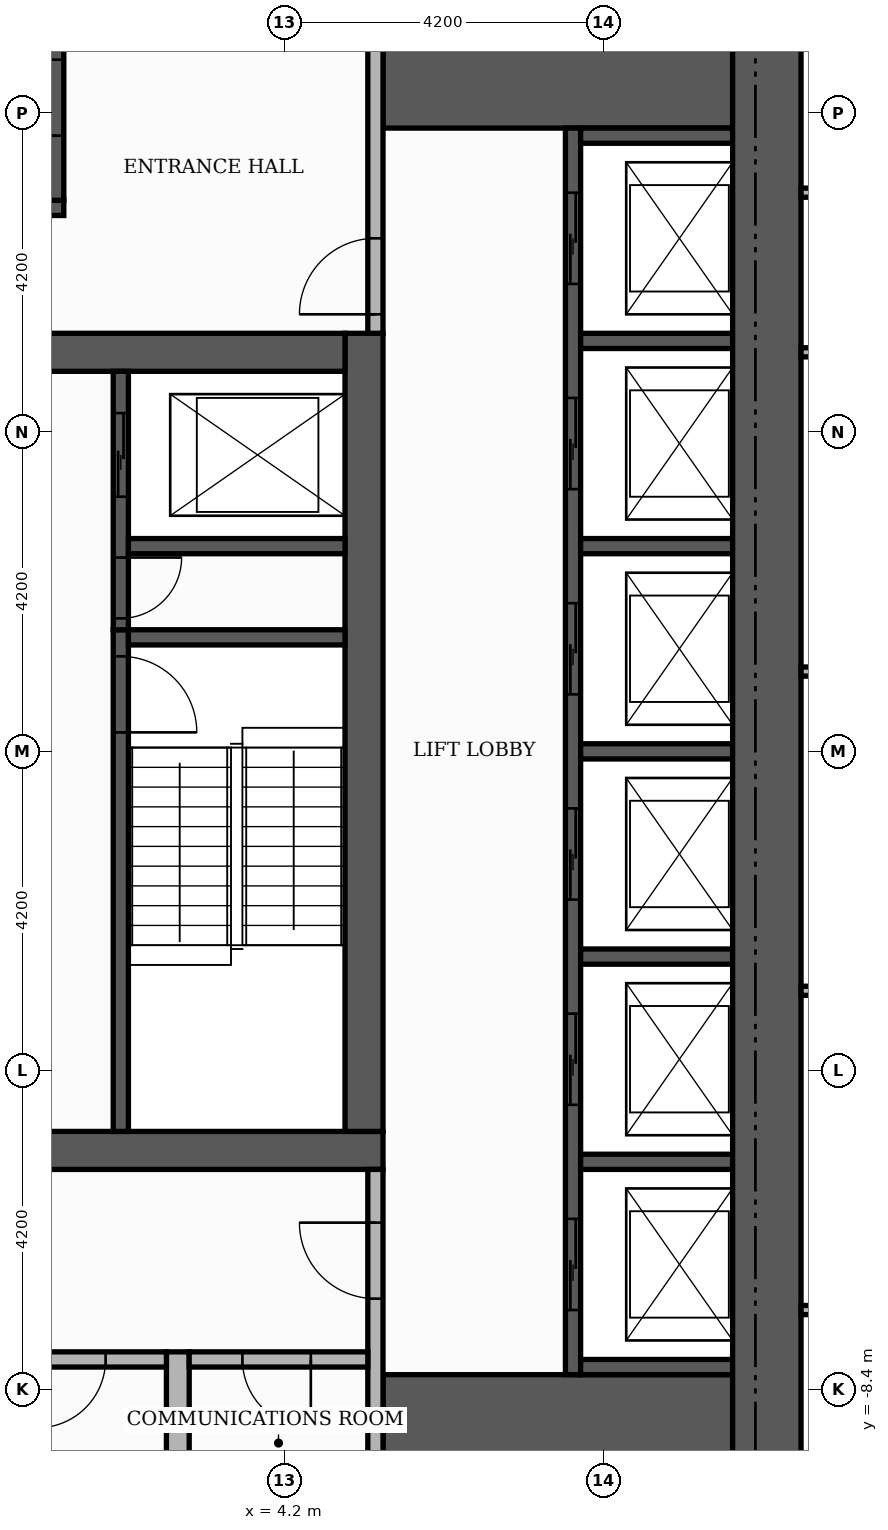
"""IFC4 building model, lengths in metres.
Left out: names, types, materials, properties, quantities, classifications, styles, units other than length and angle.
Written with IfcOpenShell. Run it as: python <this file> out.ifc"""

import sys

from ifc_helpers import new_model, si_unit, direction, frame, frame_2d, origin, place, context, subcontext, project, spatial, rectangle, extrude, element, fill, save


model = new_model("IFC4")
c1 = context("Model", 3, precision=1e-05, world=origin(), true_north=direction((0.0, 1.0)))
c2 = subcontext(c1, "Body", "Model", "MODEL_VIEW")
j1 = project(units=[si_unit("LENGTHUNIT", "METRE"), si_unit("PLANEANGLEUNIT", "RADIAN")], contexts=[c1])
p1 = place(None, origin())
s1 = spatial("IfcSite", under=j1, at=p1, CompositionType="ELEMENT")
p2 = place(p1, origin())
s2 = spatial("IfcBuilding", under=s1, at=p2, CompositionType="ELEMENT")
p3 = place(p2, frame((0.0, 0.0, 231.3)))
s3 = spatial("IfcBuildingStorey", under=s2, at=p3, CompositionType="ELEMENT", Elevation=231.3)
p4 = place(p3, frame((-5.5, -5.25, 0.0), z_axis=(0.0, 0.0, 1.0), x_axis=(1.0, 0.0, 0.0)))
e1 = element("IfcWall", 1, at=p4, inside=s3, PredefinedType="SHEAR", context=c2, shape_type="SweptSolid", body=[
    extrude(rectangle(XDim=11.0, YDim=0.5, at=frame_2d((5.5, 0.0))), origin(), (0.0, 0.0, 1.0), 3.4),
])
p5 = place(p4, frame((4.9, 0.0, 0.0)))
e2 = element("IfcOpeningElement", 2, at=p5, cuts=e1, PredefinedType="OPENING", context=c2, shape_type="SweptSolid", body=[
    extrude(rectangle(XDim=1.2, YDim=2.1, at=frame_2d((0.6, 1.05))), frame((0.0, 0.26, 0.0), z_axis=(0.0, -1.0, 0.0), x_axis=(1.0, 0.0, 0.0)), (0.0, 0.0, 1.0), 0.52),
])
p6 = place(p3, frame((5.25, -5.0, 0.0), z_axis=(0.0, 0.0, 1.0), x_axis=(0.0, 1.0, 0.0)))
e3 = element("IfcWall", 3, at=p6, inside=s3, PredefinedType="SHEAR", context=c2, shape_type="SweptSolid", body=[
    extrude(rectangle(XDim=10.5, YDim=0.5, at=frame_2d((5.25, 0.0))), origin(), (0.0, 0.0, 1.0), 3.4),
])
p7 = place(p3, frame((-5.0, 5.25, 0.0), z_axis=(0.0, 0.0, 1.0), x_axis=(1.0, 0.0, 0.0)))
e4 = element("IfcWall", 4, at=p7, inside=s3, PredefinedType="SHEAR", context=c2, shape_type="SweptSolid", body=[
    extrude(rectangle(XDim=10.0, YDim=0.5, at=frame_2d((5.0, 0.0))), origin(), (0.0, 0.0, 1.0), 3.4),
])
p8 = place(p7, frame((4.4, 0.0, 0.0)))
e5 = element("IfcOpeningElement", 5, at=p8, cuts=e4, PredefinedType="OPENING", context=c2, shape_type="SweptSolid", body=[
    extrude(rectangle(XDim=1.2, YDim=2.1, at=frame_2d((0.6, 1.05))), frame((0.0, 0.26, 0.0), z_axis=(0.0, -1.0, 0.0), x_axis=(1.0, 0.0, 0.0)), (0.0, 0.0, 1.0), 0.52),
])
for number, where, z_axis, x_axis in (
    (6, (5.5, -9.15, 0.0), (0.0, 0.0, 1.0), (1.0, 0.0, 0.0)),
    (7, (5.5, 9.15, 0.0), (0.0, 0.0, 1.0), (1.0, 0.0, 0.0)),
):
    element("IfcWall", number, at=place(p3, frame(where, z_axis=z_axis, x_axis=x_axis)), inside=s3, PredefinedType="SHEAR", context=c2, shape_type="SweptSolid", body=[
        extrude(rectangle(XDim=4.6, YDim=1.9, at=frame_2d((2.3, 0.0))), origin(), (0.0, 0.0, 1.0), 3.4),
    ])
p9 = place(p3, frame((2.05, -5.0, 0.0), z_axis=(0.0, 0.0, 1.0), x_axis=(0.0, 1.0, 0.0)))
e8 = element("IfcWall", 8, at=p9, inside=s3, PredefinedType="SHEAR", context=c2, shape_type="SweptSolid", body=[
    extrude(rectangle(XDim=6.6, YDim=0.2, at=frame_2d((3.3, 0.0))), origin(), (0.0, 0.0, 1.0), 3.4),
])
p10 = place(p9, frame((5.25, 0.0, 0.0)))
e9 = element("IfcOpeningElement", 9, at=p10, cuts=e8, PredefinedType="OPENING", context=c2, shape_type="SweptSolid", body=[
    extrude(rectangle(XDim=1.0, YDim=2.1, at=frame_2d((0.5, 1.05))), frame((0.0, 0.11, 0.0), z_axis=(0.0, -1.0, 0.0), x_axis=(1.0, 0.0, 0.0)), (0.0, 0.0, 1.0), 0.22),
])
p11 = place(p3, frame((2.15, 1.5, 0.0), z_axis=(0.0, 0.0, 1.0), x_axis=(1.0, 0.0, 0.0)))
e10 = element("IfcWall", 10, at=p11, inside=s3, PredefinedType="SHEAR", context=c2, shape_type="SweptSolid", body=[
    extrude(rectangle(XDim=2.85, YDim=0.2, at=frame_2d((1.425, 0.0))), origin(), (0.0, 0.0, 1.0), 3.4),
])
p12 = place(p3, frame((-5.5, 7.15, 0.0), z_axis=(0.0, 0.0, 1.0), x_axis=(1.0, 0.0, 0.0)))
e11 = element("IfcWall", 11, at=p12, inside=s3, PredefinedType="SHEAR", context=c2, shape_type="SweptSolid", body=[
    extrude(rectangle(XDim=6.8, YDim=0.2, at=frame_2d((3.4, 0.0))), origin(), (0.0, 0.0, 1.0), 3.4),
])
p13 = place(p3, frame((1.2, 7.25, 0.0), z_axis=(0.0, 0.0, 1.0), x_axis=(0.0, 1.0, 0.0)))
e12 = element("IfcWall", 12, at=p13, inside=s3, PredefinedType="SHEAR", context=c2, shape_type="SweptSolid", body=[
    extrude(rectangle(XDim=2.85, YDim=0.2, at=frame_2d((1.425, 0.0))), origin(), (0.0, 0.0, 1.0), 3.4),
])
p14 = place(p13, frame((0.85, 0.0, 0.0)))
e13 = element("IfcOpeningElement", 13, at=p14, cuts=e12, PredefinedType="OPENING", context=c2, shape_type="SweptSolid", body=[
    extrude(rectangle(XDim=1.0, YDim=2.1, at=frame_2d((0.5, 1.05))), frame((0.0, 0.11, 0.0), z_axis=(0.0, -1.0, 0.0), x_axis=(1.0, 0.0, 0.0)), (0.0, 0.0, 1.0), 0.22),
])
p15 = place(p3, frame((8.0, -8.2, 0.0), z_axis=(0.0, 0.0, 1.0), x_axis=(0.0, 1.0, 0.0)))
e14 = element("IfcWall", 14, at=p15, inside=s3, PredefinedType="SHEAR", context=c2, shape_type="SweptSolid", body=[
    extrude(rectangle(XDim=16.4, YDim=0.2, at=frame_2d((8.2, 0.0))), origin(), (0.0, 0.0, 1.0), 3.4),
])
p16 = place(p15, frame((0.85, 0.0, 0.0)))
e15 = element("IfcOpeningElement", 15, at=p16, cuts=e14, PredefinedType="OPENING", context=c2, shape_type="SweptSolid", body=[
    extrude(rectangle(XDim=1.2, YDim=2.1, at=frame_2d((0.6, 1.05))), frame((0.0, 0.11, 0.0), z_axis=(0.0, -1.0, 0.0), x_axis=(1.0, 0.0, 0.0)), (0.0, 0.0, 1.0), 0.22),
])
p17 = place(p15, frame((3.55, 0.0, 0.0)))
e16 = element("IfcOpeningElement", 16, at=p17, cuts=e14, PredefinedType="OPENING", context=c2, shape_type="SweptSolid", body=[
    extrude(rectangle(XDim=1.2, YDim=2.1, at=frame_2d((0.6, 1.05))), frame((0.0, 0.11, 0.0), z_axis=(0.0, -1.0, 0.0), x_axis=(1.0, 0.0, 0.0)), (0.0, 0.0, 1.0), 0.22),
])
p18 = place(p15, frame((6.25, 0.0, 0.0)))
e17 = element("IfcOpeningElement", 17, at=p18, cuts=e14, PredefinedType="OPENING", context=c2, shape_type="SweptSolid", body=[
    extrude(rectangle(XDim=1.2, YDim=2.1, at=frame_2d((0.6, 1.05))), frame((0.0, 0.11, 0.0), z_axis=(0.0, -1.0, 0.0), x_axis=(1.0, 0.0, 0.0)), (0.0, 0.0, 1.0), 0.22),
])
p19 = place(p15, frame((8.95, 0.0, 0.0)))
e18 = element("IfcOpeningElement", 18, at=p19, cuts=e14, PredefinedType="OPENING", context=c2, shape_type="SweptSolid", body=[
    extrude(rectangle(XDim=1.2, YDim=2.1, at=frame_2d((0.6, 1.05))), frame((0.0, 0.11, 0.0), z_axis=(0.0, -1.0, 0.0), x_axis=(1.0, 0.0, 0.0)), (0.0, 0.0, 1.0), 0.22),
])
p20 = place(p15, frame((11.65, 0.0, 0.0)))
e19 = element("IfcOpeningElement", 19, at=p20, cuts=e14, PredefinedType="OPENING", context=c2, shape_type="SweptSolid", body=[
    extrude(rectangle(XDim=1.2, YDim=2.1, at=frame_2d((0.6, 1.05))), frame((0.0, 0.11, 0.0), z_axis=(0.0, -1.0, 0.0), x_axis=(1.0, 0.0, 0.0)), (0.0, 0.0, 1.0), 0.22),
])
p21 = place(p15, frame((14.35, 0.0, 0.0)))
e20 = element("IfcOpeningElement", 20, at=p21, cuts=e14, PredefinedType="OPENING", context=c2, shape_type="SweptSolid", body=[
    extrude(rectangle(XDim=1.2, YDim=2.1, at=frame_2d((0.6, 1.05))), frame((0.0, 0.11, 0.0), z_axis=(0.0, -1.0, 0.0), x_axis=(1.0, 0.0, 0.0)), (0.0, 0.0, 1.0), 0.22),
])
for number, where, z_axis, x_axis in (
    (21, (8.1, -8.1, 0.0), (0.0, 0.0, 1.0), (1.0, 0.0, 0.0)),
    (22, (8.1, -5.4, 0.0), (0.0, 0.0, 1.0), (1.0, 0.0, 0.0)),
    (23, (8.1, -2.7, 0.0), (0.0, 0.0, 1.0), (1.0, 0.0, 0.0)),
    (24, (8.1, 0.0, 0.0), (0.0, 0.0, 1.0), (1.0, 0.0, 0.0)),
):
    element("IfcWall", number, at=place(p3, frame(where, z_axis=z_axis, x_axis=x_axis)), inside=s3, PredefinedType="SHEAR", context=c2, shape_type="SweptSolid", body=[
        extrude(rectangle(XDim=2.0, YDim=0.2, at=frame_2d((1.0, 0.0))), origin(), (0.0, 0.0, 1.0), 3.4),
    ])
p22 = place(p3, frame((2.05, 1.6, 0.0), z_axis=(0.0, 0.0, 1.0), x_axis=(0.0, 1.0, 0.0)))
e25 = element("IfcWall", 25, at=p22, inside=s3, PredefinedType="SHEAR", context=c2, shape_type="SweptSolid", body=[
    extrude(rectangle(XDim=3.4, YDim=0.2, at=frame_2d((1.7, 0.0))), origin(), (0.0, 0.0, 1.0), 3.4),
])
p23 = place(p22, frame((1.75, 0.0, 0.0)))
e26 = element("IfcOpeningElement", 26, at=p23, cuts=e25, PredefinedType="OPENING", context=c2, shape_type="SweptSolid", body=[
    extrude(rectangle(XDim=1.1, YDim=2.1, at=frame_2d((0.55, 1.05))), frame((0.0, 0.11, 0.0), z_axis=(0.0, -1.0, 0.0), x_axis=(1.0, 0.0, 0.0)), (0.0, 0.0, 1.0), 0.22),
])
p24 = place(p22, frame((0.15, 0.0, 0.0)))
e27 = element("IfcOpeningElement", 27, at=p24, cuts=e25, PredefinedType="OPENING", context=c2, shape_type="SweptSolid", body=[
    extrude(rectangle(XDim=0.8, YDim=2.1, at=frame_2d((0.4, 1.05))), frame((0.0, 0.11, 0.0), z_axis=(0.0, -1.0, 0.0), x_axis=(1.0, 0.0, 0.0)), (0.0, 0.0, 1.0), 0.22),
])
p25 = place(p3, frame((2.15, 2.7, 0.0), z_axis=(0.0, 0.0, 1.0), x_axis=(1.0, 0.0, 0.0)))
e28 = element("IfcWall", 28, at=p25, inside=s3, PredefinedType="SHEAR", context=c2, shape_type="SweptSolid", body=[
    extrude(rectangle(XDim=2.85, YDim=0.2, at=frame_2d((1.425, 0.0))), origin(), (0.0, 0.0, 1.0), 3.4),
])
for number, where, z_axis, x_axis in (
    (29, (8.1, 2.7, 0.0), (0.0, 0.0, 1.0), (1.0, 0.0, 0.0)),
    (30, (8.1, 5.4, 0.0), (0.0, 0.0, 1.0), (1.0, 0.0, 0.0)),
    (31, (8.1, 8.1, 0.0), (0.0, 0.0, 1.0), (1.0, 0.0, 0.0)),
):
    element("IfcWall", number, at=place(p3, frame(where, z_axis=z_axis, x_axis=x_axis)), inside=s3, PredefinedType="SHEAR", context=c2, shape_type="SweptSolid", body=[
        extrude(rectangle(XDim=2.0, YDim=0.2, at=frame_2d((1.0, 0.0))), origin(), (0.0, 0.0, 1.0), 3.4),
    ])
p26 = place(p3, frame((10.55, -10.1, 0.0), z_axis=(0.0, 0.0, 1.0), x_axis=(0.0, 1.0, 0.0)))
e32 = element("IfcWall", 32, at=p26, inside=s3, PredefinedType="SHEAR", context=c2, shape_type="SweptSolid", body=[
    extrude(rectangle(XDim=20.2, YDim=0.9, at=frame_2d((10.1, 0.0))), origin(), (0.0, 0.0, 1.0), 3.4),
])
p27 = place(p3, frame((2.8, -10.1, 0.0), z_axis=(0.0, 0.0, 1.0), x_axis=(0.0, 1.0, 0.0)))
e33 = element("IfcWall", 33, at=p27, inside=s3, PredefinedType="PARTITIONING", context=c2, shape_type="SweptSolid", body=[
    extrude(rectangle(XDim=2.2, YDim=0.3, at=frame_2d((1.1, 0.0))), origin(), (0.0, 0.0, 1.0), 3.4),
])
p28 = place(p3, frame((5.4, -10.1, 0.0), z_axis=(0.0, 0.0, 1.0), x_axis=(0.0, 1.0, 0.0)))
e34 = element("IfcWall", 34, at=p28, inside=s3, PredefinedType="PARTITIONING", context=c2, shape_type="SweptSolid", body=[
    extrude(rectangle(XDim=4.6, YDim=0.2, at=frame_2d((2.3, 0.0))), origin(), (0.0, 0.0, 1.0), 3.4),
])
p29 = place(p28, frame((2.9, 0.0, 0.0)))
e35 = element("IfcOpeningElement", 35, at=p29, cuts=e34, PredefinedType="OPENING", context=c2, shape_type="SweptSolid", body=[
    extrude(rectangle(XDim=1.0, YDim=2.1, at=frame_2d((0.5, 1.05))), frame((0.0, 0.11, 0.0), z_axis=(0.0, -1.0, 0.0), x_axis=(1.0, 0.0, 0.0)), (0.0, 0.0, 1.0), 0.22),
])
p30 = place(p3, frame((0.1, -8.0, 0.0), z_axis=(0.0, 0.0, 1.0), x_axis=(1.0, 0.0, 0.0)))
e36 = element("IfcWall", 36, at=p30, inside=s3, PredefinedType="PARTITIONING", context=c2, shape_type="SweptSolid", body=[
    extrude(rectangle(XDim=2.55, YDim=0.2, at=frame_2d((1.275, 0.0))), origin(), (0.0, 0.0, 1.0), 3.4),
])
p31 = place(p30, frame((0.85, 0.0, 0.0)))
e37 = element("IfcOpeningElement", 37, at=p31, cuts=e36, PredefinedType="OPENING", context=c2, shape_type="SweptSolid", body=[
    extrude(rectangle(XDim=0.9, YDim=2.1, at=frame_2d((0.45, 1.05))), frame((0.0, 0.11, 0.0), z_axis=(0.0, -1.0, 0.0), x_axis=(1.0, 0.0, 0.0)), (0.0, 0.0, 1.0), 0.22),
])
p32 = place(p3, frame((2.95, -8.0, 0.0), z_axis=(0.0, 0.0, 1.0), x_axis=(1.0, 0.0, 0.0)))
e38 = element("IfcWall", 38, at=p32, inside=s3, PredefinedType="PARTITIONING", context=c2, shape_type="SweptSolid", body=[
    extrude(rectangle(XDim=2.35, YDim=0.2, at=frame_2d((1.175, 0.0))), origin(), (0.0, 0.0, 1.0), 3.4),
])
p33 = place(p32, frame((0.7, 0.0, 0.0)))
e39 = element("IfcOpeningElement", 39, at=p33, cuts=e38, PredefinedType="OPENING", context=c2, shape_type="SweptSolid", body=[
    extrude(rectangle(XDim=0.9, YDim=2.1, at=frame_2d((0.45, 1.05))), frame((0.0, 0.11, 0.0), z_axis=(0.0, -1.0, 0.0), x_axis=(1.0, 0.0, 0.0)), (0.0, 0.0, 1.0), 0.22),
])
p34 = place(p3, frame((5.4, 5.5, 0.0), z_axis=(0.0, 0.0, 1.0), x_axis=(0.0, 1.0, 0.0)))
e40 = element("IfcWall", 40, at=p34, inside=s3, PredefinedType="PARTITIONING", context=c2, shape_type="SweptSolid", body=[
    extrude(rectangle(XDim=4.6, YDim=0.2, at=frame_2d((2.3, 0.0))), origin(), (0.0, 0.0, 1.0), 3.4),
])
p35 = place(p34, frame((0.25, 0.0, 0.0)))
e41 = element("IfcOpeningElement", 41, at=p35, cuts=e40, PredefinedType="OPENING", context=c2, shape_type="SweptSolid", body=[
    extrude(rectangle(XDim=1.0, YDim=2.1, at=frame_2d((0.5, 1.05))), frame((0.0, 0.11, 0.0), z_axis=(0.0, -1.0, 0.0), x_axis=(1.0, 0.0, 0.0)), (0.0, 0.0, 1.0), 0.22),
])
p36 = place(p3, frame((11.0, -7.35, 0.0), z_axis=(0.0, 0.0, 1.0), x_axis=(1.0, 0.0, 0.0)))
e42 = element("IfcWall", 42, at=p36, inside=s3, PredefinedType="PARTITIONING", context=c2, shape_type="SweptSolid", body=[
    extrude(rectangle(XDim=7.92, YDim=0.12, at=frame_2d((3.96, 0.0))), origin(), (0.0, 0.0, 1.0), 3.4),
])
p37 = place(p36, frame((3.51, 0.0, 0.0)))
e43 = element("IfcOpeningElement", 43, at=p37, cuts=e42, PredefinedType="OPENING", context=c2, shape_type="SweptSolid", body=[
    extrude(rectangle(XDim=0.9, YDim=2.1, at=frame_2d((0.45, 1.05))), frame((0.0, 0.07, 0.0), z_axis=(0.0, -1.0, 0.0), x_axis=(1.0, 0.0, 0.0)), (0.0, 0.0, 1.0), 0.14),
])
for number, where, z_axis, x_axis in (
    (44, (11.0, -3.15, 0.0), (0.0, 0.0, 1.0), (1.0, 0.0, 0.0)),
    (45, (11.0, 1.05, 0.0), (0.0, 0.0, 1.0), (1.0, 0.0, 0.0)),
    (46, (11.0, 5.25, 0.0), (0.0, 0.0, 1.0), (1.0, 0.0, 0.0)),
    (47, (11.0, 7.35, 0.0), (0.0, 0.0, 1.0), (1.0, 0.0, 0.0)),
):
    element("IfcWall", number, at=place(p3, frame(where, z_axis=z_axis, x_axis=x_axis)), inside=s3, PredefinedType="PARTITIONING", context=c2, shape_type="SweptSolid", body=[
        extrude(rectangle(XDim=7.92, YDim=0.12, at=frame_2d((3.96, 0.0))), origin(), (0.0, 0.0, 1.0), 3.4),
    ])
p38 = place(p16, origin())
e48 = element("IfcDoor", 48, at=p38, inside=s3, OperationType="SLIDING_TO_LEFT", PredefinedType="DOOR", context=c2, shape_type="SweptSolid", body=[
    extrude(rectangle(XDim=1.2, YDim=2.1, at=frame_2d((0.6, 1.05))), frame((0.0, 0.025, 0.0), z_axis=(0.0, -1.0, 0.0), x_axis=(1.0, 0.0, 0.0)), (0.0, 0.0, 1.0), 0.05),
])
fill(e15, e48)
p39 = place(p17, origin())
e49 = element("IfcDoor", 49, at=p39, inside=s3, OperationType="SLIDING_TO_LEFT", PredefinedType="DOOR", context=c2, shape_type="SweptSolid", body=[
    extrude(rectangle(XDim=1.2, YDim=2.1, at=frame_2d((0.6, 1.05))), frame((0.0, 0.025, 0.0), z_axis=(0.0, -1.0, 0.0), x_axis=(1.0, 0.0, 0.0)), (0.0, 0.0, 1.0), 0.05),
])
fill(e16, e49)
p40 = place(p18, origin())
e50 = element("IfcDoor", 50, at=p40, inside=s3, OperationType="SLIDING_TO_LEFT", PredefinedType="DOOR", context=c2, shape_type="SweptSolid", body=[
    extrude(rectangle(XDim=1.2, YDim=2.1, at=frame_2d((0.6, 1.05))), frame((0.0, 0.025, 0.0), z_axis=(0.0, -1.0, 0.0), x_axis=(1.0, 0.0, 0.0)), (0.0, 0.0, 1.0), 0.05),
])
fill(e17, e50)
p41 = place(p19, origin())
e51 = element("IfcDoor", 51, at=p41, inside=s3, OperationType="SLIDING_TO_LEFT", PredefinedType="DOOR", context=c2, shape_type="SweptSolid", body=[
    extrude(rectangle(XDim=1.2, YDim=2.1, at=frame_2d((0.6, 1.05))), frame((0.0, 0.025, 0.0), z_axis=(0.0, -1.0, 0.0), x_axis=(1.0, 0.0, 0.0)), (0.0, 0.0, 1.0), 0.05),
])
fill(e18, e51)
p42 = place(p20, origin())
e52 = element("IfcDoor", 52, at=p42, inside=s3, OperationType="SLIDING_TO_LEFT", PredefinedType="DOOR", context=c2, shape_type="SweptSolid", body=[
    extrude(rectangle(XDim=1.2, YDim=2.1, at=frame_2d((0.6, 1.05))), frame((0.0, 0.025, 0.0), z_axis=(0.0, -1.0, 0.0), x_axis=(1.0, 0.0, 0.0)), (0.0, 0.0, 1.0), 0.05),
])
fill(e19, e52)
p43 = place(p21, origin())
e53 = element("IfcDoor", 53, at=p43, inside=s3, OperationType="SLIDING_TO_LEFT", PredefinedType="DOOR", context=c2, shape_type="SweptSolid", body=[
    extrude(rectangle(XDim=1.2, YDim=2.1, at=frame_2d((0.6, 1.05))), frame((0.0, 0.025, 0.0), z_axis=(0.0, -1.0, 0.0), x_axis=(1.0, 0.0, 0.0)), (0.0, 0.0, 1.0), 0.05),
])
fill(e20, e53)
p44 = place(p23, origin())
e54 = element("IfcDoor", 54, at=p44, inside=s3, OperationType="SLIDING_TO_LEFT", PredefinedType="DOOR", context=c2, shape_type="SweptSolid", body=[
    extrude(rectangle(XDim=1.1, YDim=2.1, at=frame_2d((0.55, 1.05))), frame((0.0, 0.025, 0.0), z_axis=(0.0, -1.0, 0.0), x_axis=(1.0, 0.0, 0.0)), (0.0, 0.0, 1.0), 0.05),
])
fill(e26, e54)
p45 = place(p10, frame((1.0, 0.0, 0.0), z_axis=(0.0, 0.0, 1.0), x_axis=(-1.0, 0.0, 0.0)))
e55 = element("IfcDoor", 55, at=p45, inside=s3, OperationType="SINGLE_SWING_LEFT", PredefinedType="DOOR", context=c2, shape_type="SweptSolid", body=[
    extrude(rectangle(XDim=1.0, YDim=2.1, at=frame_2d((0.5, 1.05))), frame((0.0, 0.025, 0.0), z_axis=(0.0, -1.0, 0.0), x_axis=(1.0, 0.0, 0.0)), (0.0, 0.0, 1.0), 0.05),
])
fill(e9, e55)
p46 = place(p24, frame((0.8, 0.0, 0.0), z_axis=(0.0, 0.0, 1.0), x_axis=(-1.0, 0.0, 0.0)))
e56 = element("IfcDoor", 56, at=p46, inside=s3, OperationType="SINGLE_SWING_RIGHT", PredefinedType="DOOR", context=c2, shape_type="SweptSolid", body=[
    extrude(rectangle(XDim=0.8, YDim=2.1, at=frame_2d((0.4, 1.05))), frame((0.0, 0.025, 0.0), z_axis=(0.0, -1.0, 0.0), x_axis=(1.0, 0.0, 0.0)), (0.0, 0.0, 1.0), 0.05),
])
fill(e27, e56)
p47 = place(p14, origin())
e57 = element("IfcDoor", 57, at=p47, inside=s3, OperationType="SINGLE_SWING_LEFT", PredefinedType="DOOR", context=c2, shape_type="SweptSolid", body=[
    extrude(rectangle(XDim=1.0, YDim=2.1, at=frame_2d((0.5, 1.05))), frame((0.0, 0.025, 0.0), z_axis=(0.0, -1.0, 0.0), x_axis=(1.0, 0.0, 0.0)), (0.0, 0.0, 1.0), 0.05),
])
fill(e13, e57)
p48 = place(p35, origin())
e58 = element("IfcDoor", 58, at=p48, inside=s3, OperationType="SINGLE_SWING_LEFT", PredefinedType="DOOR", context=c2, shape_type="SweptSolid", body=[
    extrude(rectangle(XDim=1.0, YDim=2.1, at=frame_2d((0.5, 1.05))), frame((0.0, 0.025, 0.0), z_axis=(0.0, -1.0, 0.0), x_axis=(1.0, 0.0, 0.0)), (0.0, 0.0, 1.0), 0.05),
])
fill(e41, e58)
p49 = place(p29, origin())
e59 = element("IfcDoor", 59, at=p49, inside=s3, OperationType="SINGLE_SWING_RIGHT", PredefinedType="DOOR", context=c2, shape_type="SweptSolid", body=[
    extrude(rectangle(XDim=1.0, YDim=2.1, at=frame_2d((0.5, 1.05))), frame((0.0, 0.025, 0.0), z_axis=(0.0, -1.0, 0.0), x_axis=(1.0, 0.0, 0.0)), (0.0, 0.0, 1.0), 0.05),
])
fill(e35, e59)
p50 = place(p31, frame((0.9, 0.0, 0.0), z_axis=(0.0, 0.0, 1.0), x_axis=(-1.0, 0.0, 0.0)))
e60 = element("IfcDoor", 60, at=p50, inside=s3, OperationType="SINGLE_SWING_LEFT", PredefinedType="DOOR", context=c2, shape_type="SweptSolid", body=[
    extrude(rectangle(XDim=0.9, YDim=2.1, at=frame_2d((0.45, 1.05))), frame((0.0, 0.025, 0.0), z_axis=(0.0, -1.0, 0.0), x_axis=(1.0, 0.0, 0.0)), (0.0, 0.0, 1.0), 0.05),
])
fill(e37, e60)
p51 = place(p33, frame((0.9, 0.0, 0.0), z_axis=(0.0, 0.0, 1.0), x_axis=(-1.0, 0.0, 0.0)))
e61 = element("IfcDoor", 61, at=p51, inside=s3, OperationType="SINGLE_SWING_RIGHT", PredefinedType="DOOR", context=c2, shape_type="SweptSolid", body=[
    extrude(rectangle(XDim=0.9, YDim=2.1, at=frame_2d((0.45, 1.05))), frame((0.0, 0.025, 0.0), z_axis=(0.0, -1.0, 0.0), x_axis=(1.0, 0.0, 0.0)), (0.0, 0.0, 1.0), 0.05),
])
fill(e39, e61)
save(model, sys.argv[1])
